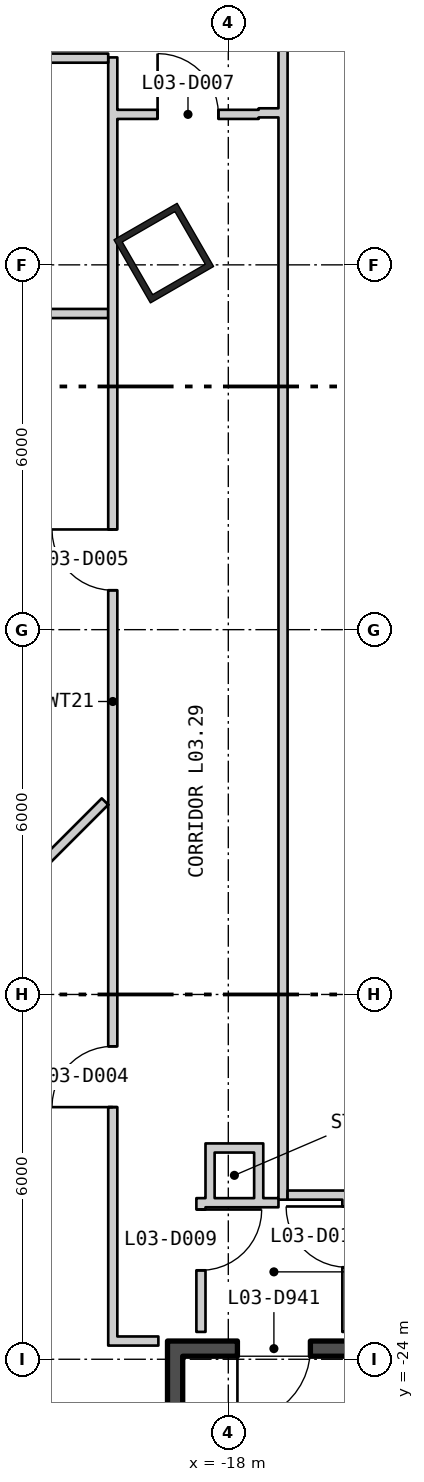
"""IFC4 building model, lengths in metres.
Left out: names, types, materials, properties, quantities, classifications, styles, units other than length and angle.
Written with IfcOpenShell. Run it as: python <this file> out.ifc"""

import sys

from ifc_helpers import new_model, si_unit, direction, frame, frame_2d, origin, origin_2d, place, context, subcontext, project, spatial, rectangle, hollow_rectangle, extrude, element, fill, save


model = new_model("IFC4")
c1 = context("Model", 3, precision=1e-05, world=origin(), true_north=direction((0.0, 1.0)))
c2 = subcontext(c1, "Body", "Model", "MODEL_VIEW")
j1 = project(units=[si_unit("LENGTHUNIT", "METRE"), si_unit("PLANEANGLEUNIT", "RADIAN")], contexts=[c1])
p1 = place(None, origin())
s1 = spatial("IfcSite", under=j1, at=p1, CompositionType="ELEMENT")
p2 = place(p1, origin())
s2 = spatial("IfcBuilding", under=s1, at=p2, CompositionType="ELEMENT")
p3 = place(p2, frame((0.0, 0.0, 18.6)))
s3 = spatial("IfcBuildingStorey", under=s2, at=p3, CompositionType="ELEMENT", Elevation=18.6)
p4 = place(p3, frame((-19.061, -5.807, 0.0), z_axis=(0.0, 0.0, 1.0), x_axis=(0.5, -0.866025403784, 0.0)))
e1 = element("IfcColumn", 1, at=p4, inside=s3, PredefinedType="COLUMN", context=c2, shape_type="SweptSolid", body=[
    extrude(hollow_rectangle(XDim=1.2, YDim=1.2, WallThickness=0.1, at=origin_2d()), origin(), (0.0, 0.0, 1.0), 5.1),
])
p5 = place(p3, frame((-18.875, -31.25, 0.0), z_axis=(0.0, 0.0, 1.0), x_axis=(0.0, 1.0, 0.0)))
e2 = element("IfcWall", 2, at=p5, inside=s3, PredefinedType="SHEAR", context=c2, shape_type="SweptSolid", body=[
    extrude(rectangle(XDim=7.3, YDim=0.25, at=frame_2d((3.65, 0.0))), origin(), (0.0, 0.0, 1.0), 4.88),
])
p6 = place(p3, frame((-19.0, -23.825, 0.0), z_axis=(0.0, 0.0, 1.0), x_axis=(1.0, 0.0, 0.0)))
e3 = element("IfcWall", 3, at=p6, inside=s3, PredefinedType="SHEAR", context=c2, shape_type="SweptSolid", body=[
    extrude(rectangle(XDim=3.5, YDim=0.25, at=frame_2d((1.75, 0.0))), origin(), (0.0, 0.0, 1.0), 4.88),
])
p7 = place(p6, frame((1.15, 0.0, 0.0)))
e4 = element("IfcOpeningElement", 4, at=p7, cuts=e3, PredefinedType="OPENING", context=c2, shape_type="SweptSolid", body=[
    extrude(rectangle(XDim=1.2, YDim=2.1, at=frame_2d((0.6, 1.05))), frame((0.0, 0.135, 0.0), z_axis=(0.0, -1.0, 0.0), x_axis=(1.0, 0.0, 0.0)), (0.0, 0.0, 1.0), 0.27),
])
p8 = place(p3, frame((-26.75, -6.8, 0.0), z_axis=(0.0, 0.0, 1.0), x_axis=(1.0, 0.0, 0.0)))
e5 = element("IfcWall", 5, at=p8, inside=s3, PredefinedType="PARTITIONING", context=c2, shape_type="SweptSolid", body=[
    extrude(rectangle(XDim=6.775, YDim=0.15, at=frame_2d((3.388, 0.0))), origin(), (0.0, 0.0, 1.0), 4.09),
])
p9 = place(p3, frame((-25.026, -19.825, 0.0), z_axis=(0.0, 0.0, 1.0), x_axis=(0.707106781187, 0.707106781187, 0.0)))
e6 = element("IfcWall", 6, at=p9, inside=s3, PredefinedType="PARTITIONING", context=c2, shape_type="SweptSolid", body=[
    extrude(rectangle(XDim=7.068, YDim=0.15, at=frame_2d((3.534, 0.0))), origin(), (0.0, 0.0, 1.0), 4.88),
])
p10 = place(p3, frame((-24.55, -2.6, 0.0), z_axis=(0.0, 0.0, 1.0), x_axis=(1.0, 0.0, 0.0)))
e7 = element("IfcWall", 7, at=p10, inside=s3, PredefinedType="PARTITIONING", context=c2, shape_type="SweptSolid", body=[
    extrude(rectangle(XDim=4.575, YDim=0.15, at=frame_2d((2.288, 0.0))), origin(), (0.0, 0.0, 1.0), 4.88),
])
p11 = place(p10, frame((1.736, 0.0, 0.0)))
e8 = element("IfcOpeningElement", 8, at=p11, cuts=e7, PredefinedType="OPENING", context=c2, shape_type="SweptSolid", body=[
    extrude(rectangle(XDim=1.0, YDim=2.1, at=frame_2d((0.5, 1.05))), frame((0.0, 0.085, 0.0), z_axis=(0.0, -1.0, 0.0), x_axis=(1.0, 0.0, 0.0)), (0.0, 0.0, 1.0), 0.17),
])
p12 = place(p3, frame((-19.9, -23.775, 0.0), z_axis=(0.0, 0.0, 1.0), x_axis=(0.0, 1.0, 0.0)))
e9 = element("IfcWall", 9, at=p12, inside=s3, PredefinedType="PARTITIONING", context=c2, shape_type="SweptSolid", body=[
    extrude(rectangle(XDim=21.187, YDim=0.15, at=frame_2d((10.594, 0.0))), origin(), (0.0, 0.0, 1.0), 4.88),
])
p13 = place(p12, frame((3.922, 0.0, 0.0)))
e10 = element("IfcOpeningElement", 10, at=p13, cuts=e9, PredefinedType="OPENING", context=c2, shape_type="SweptSolid", body=[
    extrude(rectangle(XDim=1.0, YDim=2.1, at=frame_2d((0.5, 1.05))), frame((0.0, 0.085, 0.0), z_axis=(0.0, -1.0, 0.0), x_axis=(1.0, 0.0, 0.0)), (0.0, 0.0, 1.0), 0.17),
])
p14 = place(p12, frame((12.423, 0.0, 0.0)))
e11 = element("IfcOpeningElement", 11, at=p14, cuts=e9, PredefinedType="OPENING", context=c2, shape_type="SweptSolid", body=[
    extrude(rectangle(XDim=1.0, YDim=2.1, at=frame_2d((0.5, 1.05))), frame((0.0, 0.085, 0.0), z_axis=(0.0, -1.0, 0.0), x_axis=(1.0, 0.0, 0.0)), (0.0, 0.0, 1.0), 0.17),
])
p15 = place(p3, frame((-19.825, -23.7, 0.0), z_axis=(0.0, 0.0, 1.0), x_axis=(1.0, 0.0, 0.0)))
e12 = element("IfcWall", 12, at=p15, inside=s3, PredefinedType="PARTITIONING", context=c2, shape_type="SweptSolid", body=[
    extrude(rectangle(XDim=0.675, YDim=0.15, at=frame_2d((0.338, 0.0))), origin(), (0.0, 0.0, 1.0), 4.88),
])
p16 = place(p3, frame((-19.825, -3.525, 0.0), z_axis=(0.0, 0.0, 1.0), x_axis=(1.0, 0.0, 0.0)))
e13 = element("IfcWall", 13, at=p16, inside=s3, PredefinedType="PARTITIONING", context=c2, shape_type="SweptSolid", body=[
    extrude(rectangle(XDim=2.325, YDim=0.15, at=frame_2d((1.163, 0.0))), origin(), (0.0, 0.0, 1.0), 4.88),
])
p17 = place(p16, frame((0.662, 0.0, 0.0)))
e14 = element("IfcOpeningElement", 14, at=p17, cuts=e13, PredefinedType="OPENING", context=c2, shape_type="SweptSolid", body=[
    extrude(rectangle(XDim=1.0, YDim=2.1, at=frame_2d((0.5, 1.05))), frame((0.0, 0.085, 0.0), z_axis=(0.0, -1.0, 0.0), x_axis=(1.0, 0.0, 0.0)), (0.0, 0.0, 1.0), 0.17),
])
p18 = place(p3, frame((-18.45, -23.55, 0.0), z_axis=(0.0, 0.0, 1.0), x_axis=(0.0, 1.0, 0.0)))
e15 = element("IfcWall", 15, at=p18, inside=s3, PredefinedType="PARTITIONING", context=c2, shape_type="SweptSolid", body=[
    extrude(rectangle(XDim=2.2, YDim=0.15, at=frame_2d((1.1, 0.0))), origin(), (0.0, 0.0, 1.0), 4.88),
])
p19 = place(p18, frame((1.013, 0.0, 0.0)))
e16 = element("IfcOpeningElement", 16, at=p19, cuts=e15, PredefinedType="OPENING", context=c2, shape_type="SweptSolid", body=[
    extrude(rectangle(XDim=1.0, YDim=2.1, at=frame_2d((0.5, 1.05))), frame((0.0, 0.085, 0.0), z_axis=(0.0, -1.0, 0.0), x_axis=(1.0, 0.0, 0.0)), (0.0, 0.0, 1.0), 0.17),
])
p20 = place(p3, frame((-18.3, -21.5, 0.0), z_axis=(0.0, 0.0, 1.0), x_axis=(0.0, 1.0, 0.0)))
e17 = element("IfcWall", 17, at=p20, inside=s3, PredefinedType="PARTITIONING", context=c2, shape_type="SweptSolid", body=[
    extrude(rectangle(XDim=1.05, YDim=0.15, at=frame_2d((0.525, 0.0))), origin(), (0.0, 0.0, 1.0), 4.88),
])
for number, where, z_axis, x_axis in (
    (18, (-18.225, -21.425, 0.0), (0.0, 0.0, 1.0), (1.0, 0.0, 0.0)),
    (19, (-18.225, -20.525, 0.0), (0.0, 0.0, 1.0), (1.0, 0.0, 0.0)),
):
    element("IfcWall", number, at=place(p3, frame(where, z_axis=z_axis, x_axis=x_axis)), inside=s3, PredefinedType="PARTITIONING", context=c2, shape_type="SweptSolid", body=[
        extrude(rectangle(XDim=0.65, YDim=0.15, at=frame_2d((0.325, 0.0))), origin(), (0.0, 0.0, 1.0), 4.88),
    ])
p21 = place(p3, frame((-17.5, -21.5, 0.0), z_axis=(0.0, 0.0, 1.0), x_axis=(0.0, 1.0, 0.0)))
e20 = element("IfcWall", 20, at=p21, inside=s3, PredefinedType="PARTITIONING", context=c2, shape_type="SweptSolid", body=[
    extrude(rectangle(XDim=1.05, YDim=0.15, at=frame_2d((0.525, 0.0))), origin(), (0.0, 0.0, 1.0), 4.88),
])
p22 = place(p3, frame((-17.5, -3.5, 0.0), z_axis=(0.0, 0.0, 1.0), x_axis=(1.0, 0.0, 0.0)))
e21 = element("IfcWall", 21, at=p22, inside=s3, PredefinedType="PARTITIONING", context=c2, shape_type="SweptSolid", body=[
    extrude(rectangle(XDim=0.325, YDim=0.15, at=frame_2d((0.163, 0.0))), origin(), (0.0, 0.0, 1.0), 4.88),
])
p23 = place(p3, frame((-17.425, -21.425, 0.0), z_axis=(0.0, 0.0, 1.0), x_axis=(1.0, 0.0, 0.0)))
e22 = element("IfcWall", 22, at=p23, inside=s3, PredefinedType="PARTITIONING", context=c2, shape_type="SweptSolid", body=[
    extrude(rectangle(XDim=0.25, YDim=0.15, at=frame_2d((0.125, 0.0))), origin(), (0.0, 0.0, 1.0), 4.88),
])
p24 = place(p3, frame((-17.1, -21.375, 0.0), z_axis=(0.0, 0.0, 1.0), x_axis=(0.0, 1.0, 0.0)))
e23 = element("IfcWall", 23, at=p24, inside=s3, PredefinedType="PARTITIONING", context=c2, shape_type="SweptSolid", body=[
    extrude(rectangle(XDim=19.05, YDim=0.15, at=frame_2d((9.525, 0.0))), origin(), (0.0, 0.0, 1.0), 4.88),
])
p25 = place(p3, frame((-17.025, -21.3, 0.0), z_axis=(0.0, 0.0, 1.0), x_axis=(1.0, 0.0, 0.0)))
e24 = element("IfcWall", 24, at=p25, inside=s3, PredefinedType="PARTITIONING", context=c2, shape_type="SweptSolid", body=[
    extrude(rectangle(XDim=10.655, YDim=0.15, at=frame_2d((5.327, 0.0))), origin(), (0.0, 0.0, 1.0), 4.88),
])
p26 = place(p3, frame((-16.05, -23.55, 0.0), z_axis=(0.0, 0.0, 1.0), x_axis=(0.0, 1.0, 0.0)))
e25 = element("IfcWall", 25, at=p26, inside=s3, PredefinedType="PARTITIONING", context=c2, shape_type="SweptSolid", body=[
    extrude(rectangle(XDim=2.175, YDim=0.15, at=frame_2d((1.087, 0.0))), origin(), (0.0, 0.0, 1.0), 4.88),
])
p27 = place(p26, frame((1.063, 0.0, 0.0)))
e26 = element("IfcOpeningElement", 26, at=p27, cuts=e25, PredefinedType="OPENING", context=c2, shape_type="SweptSolid", body=[
    extrude(rectangle(XDim=1.0, YDim=2.1, at=frame_2d((0.5, 1.05))), frame((0.0, 0.085, 0.0), z_axis=(0.0, -1.0, 0.0), x_axis=(1.0, 0.0, 0.0)), (0.0, 0.0, 1.0), 0.17),
])
p28 = place(p7, origin())
e27 = element("IfcDoor", 27, at=p28, inside=s3, OperationType="SINGLE_SWING_LEFT", PredefinedType="DOOR", context=c2, shape_type="SweptSolid", body=[
    extrude(rectangle(XDim=1.2, YDim=2.1, at=frame_2d((0.6, 1.05))), frame((0.0, 0.025, 0.0), z_axis=(0.0, -1.0, 0.0), x_axis=(1.0, 0.0, 0.0)), (0.0, 0.0, 1.0), 0.05),
])
fill(e4, e27)
p29 = place(p13, origin())
e28 = element("IfcDoor", 28, at=p29, inside=s3, OperationType="SINGLE_SWING_RIGHT", PredefinedType="DOOR", context=c2, shape_type="SweptSolid", body=[
    extrude(rectangle(XDim=1.0, YDim=2.1, at=frame_2d((0.5, 1.05))), frame((0.0, 0.025, 0.0), z_axis=(0.0, -1.0, 0.0), x_axis=(1.0, 0.0, 0.0)), (0.0, 0.0, 1.0), 0.05),
])
fill(e10, e28)
p30 = place(p14, origin())
e29 = element("IfcDoor", 29, at=p30, inside=s3, OperationType="SINGLE_SWING_LEFT", PredefinedType="DOOR", context=c2, shape_type="SweptSolid", body=[
    extrude(rectangle(XDim=1.0, YDim=2.1, at=frame_2d((0.5, 1.05))), frame((0.0, 0.025, 0.0), z_axis=(0.0, -1.0, 0.0), x_axis=(1.0, 0.0, 0.0)), (0.0, 0.0, 1.0), 0.05),
])
fill(e11, e29)
p31 = place(p17, origin())
e30 = element("IfcDoor", 30, at=p31, inside=s3, OperationType="SINGLE_SWING_RIGHT", PredefinedType="DOOR", context=c2, shape_type="SweptSolid", body=[
    extrude(rectangle(XDim=1.0, YDim=2.1, at=frame_2d((0.5, 1.05))), frame((0.0, 0.025, 0.0), z_axis=(0.0, -1.0, 0.0), x_axis=(1.0, 0.0, 0.0)), (0.0, 0.0, 1.0), 0.05),
])
fill(e14, e30)
p32 = place(p19, origin())
e31 = element("IfcDoor", 31, at=p32, inside=s3, OperationType="SINGLE_SWING_RIGHT", PredefinedType="DOOR", context=c2, shape_type="SweptSolid", body=[
    extrude(rectangle(XDim=1.0, YDim=2.1, at=frame_2d((0.5, 1.05))), frame((0.0, 0.025, 0.0), z_axis=(0.0, -1.0, 0.0), x_axis=(1.0, 0.0, 0.0)), (0.0, 0.0, 1.0), 0.05),
])
fill(e16, e31)
save(model, sys.argv[1])
